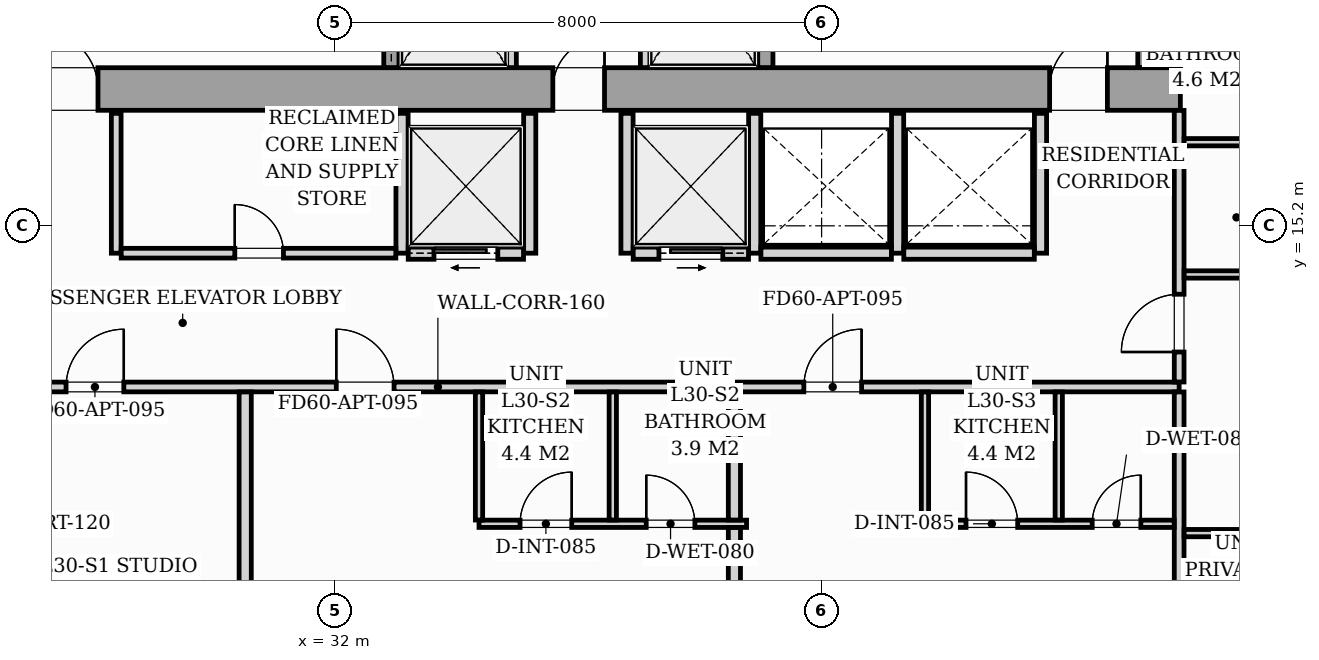
"""IFC4 building model, lengths in metres.
Left out: names, types, materials, properties, quantities, classifications, styles, units other than length and angle.
Written with IfcOpenShell. Run it as: python <this file> out.ifc"""

import sys

from ifc_helpers import new_model, si_unit, direction, frame, frame_2d, origin, origin_2d, place, context, subcontext, project, spatial, rectangle, i_section, extrude, source, transform, mapped, element, fill, save


model = new_model("IFC4")
c1 = context("Model", 3, precision=1e-05, world=origin(), true_north=direction((0.0, 1.0)))
c2 = subcontext(c1, "Body", "Model", "MODEL_VIEW")
j1 = project(units=[si_unit("LENGTHUNIT", "METRE"), si_unit("PLANEANGLEUNIT", "RADIAN")], contexts=[c1])
p1 = place(None, origin())
s1 = spatial("IfcSite", under=j1, at=p1, CompositionType="ELEMENT")
p2 = place(p1, origin())
s2 = spatial("IfcBuilding", under=s1, at=p2, CompositionType="ELEMENT")
p3 = place(p2, frame((0.0, 0.0, 106.6)))
s3 = spatial("IfcBuildingStorey", under=s2, at=p3, CompositionType="ELEMENT", Elevation=106.6)
m1 = source(origin(), c2, "Body", "SweptSolid", [
    extrude(i_section(OverallWidth=0.427, OverallDepth=0.483, WebThickness=0.051, FlangeThickness=0.082, FilletRadius=0.018, at=origin_2d()), origin(), (0.0, 0.0, 1.0), 3.196),
])
for number, where, z_axis, x_axis in (
    (1, (33.12, 17.4, 0.002), (0.0, 0.0, 1.0), (1.0, 0.0, 0.0)),
    (2, (38.88, 17.4, 0.002), (0.0, 0.0, 1.0), (1.0, 0.0, 0.0)),
    (3, (45.6, 17.4, 0.002), (0.0, 0.0, 1.0), (1.0, 0.0, 0.0)),
):
    element("IfcColumn", number, at=place(p3, frame(where, z_axis=z_axis, x_axis=x_axis)), inside=s3, PredefinedType="PILASTER", context=c2, shape_type="MappedRepresentation", body=[
        mapped(m1, transform((0.0, 0.0, 0.0), scale=1.0)),
    ])
p4 = place(p3, frame((26.1, 17.45, 0.0), z_axis=(0.0, 0.0, 1.0), x_axis=(1.0, 0.0, 0.0)))
e4 = element("IfcWall", 4, at=p4, inside=s3, PredefinedType="SHEAR", context=c2, shape_type="SweptSolid", body=[
    extrude(rectangle(XDim=19.8, YDim=0.7, at=frame_2d((9.9, 0.0))), origin(), (0.0, 0.0, 1.0), 3.2),
])
p5 = place(p4, frame((1.05, 0.0, 0.0)))
e5 = element("IfcOpeningElement", 5, at=p5, cuts=e4, PredefinedType="OPENING", context=c2, shape_type="SweptSolid", body=[
    extrude(rectangle(XDim=0.95, YDim=2.06, at=frame_2d((0.475, 1.03))), frame((0.0, 0.36, 0.0), z_axis=(0.0, -1.0, 0.0), x_axis=(1.0, 0.0, 0.0)), (0.0, 0.0, 1.0), 0.72),
])
p6 = place(p4, frame((9.48, 0.0, 0.0)))
e6 = element("IfcOpeningElement", 6, at=p6, cuts=e4, PredefinedType="OPENING", context=c2, shape_type="SweptSolid", body=[
    extrude(rectangle(XDim=0.85, YDim=2.0, at=frame_2d((0.425, 1.0))), frame((0.0, 0.36, 0.0), z_axis=(0.0, -1.0, 0.0), x_axis=(1.0, 0.0, 0.0)), (0.0, 0.0, 1.0), 0.72),
])
p7 = place(p4, frame((17.65, 0.0, 0.0)))
e7 = element("IfcOpeningElement", 7, at=p7, cuts=e4, PredefinedType="OPENING", context=c2, shape_type="SweptSolid", body=[
    extrude(rectangle(XDim=0.95, YDim=2.06, at=frame_2d((0.475, 1.03))), frame((0.0, 0.36, 0.0), z_axis=(0.0, -1.0, 0.0), x_axis=(1.0, 0.0, 0.0)), (0.0, 0.0, 1.0), 0.72),
])
p8 = place(p3, frame((45.55, 17.802, 0.0), z_axis=(0.0, 0.0, 1.0), x_axis=(0.0, 1.0, 0.0)))
e8 = element("IfcWall", 8, at=p8, inside=s3, PredefinedType="SHEAR", context=c2, shape_type="SweptSolid", body=[
    extrude(rectangle(XDim=5.796, YDim=0.7, at=frame_2d((2.898, 0.0))), origin(), (0.0, 0.0, 1.0), 3.2),
])
p9 = place(p3, frame((32.925, 17.802, 0.0), z_axis=(0.0, 0.0, 1.0), x_axis=(0.0, 1.0, 0.0)))
e9 = element("IfcWall", 9, at=p9, inside=s3, PredefinedType="SOLIDWALL", context=c2, shape_type="SweptSolid", body=[
    extrude(rectangle(XDim=2.646, YDim=0.25, at=frame_2d((1.323, 0.0))), origin(), (0.0, 0.0, 1.0), 3.2),
])
p10 = place(p9, frame((0.598, 0.0, 0.0)))
e10 = element("IfcOpeningElement", 10, at=p10, cuts=e9, PredefinedType="OPENING", context=c2, shape_type="SweptSolid", body=[
    extrude(rectangle(XDim=1.1, YDim=2.08, at=frame_2d((0.55, 1.04))), frame((0.0, 0.135, 0.0), z_axis=(0.0, -1.0, 0.0), x_axis=(1.0, 0.0, 0.0)), (0.0, 0.0, 1.0), 0.27),
])
for number, where, z_axis, x_axis in (
    (11, (34.9, 17.802, 0.0), (0.0, 0.0, 1.0), (0.0, 1.0, 0.0)),
    (12, (37.1, 17.802, 0.0), (0.0, 0.0, 1.0), (0.0, 1.0, 0.0)),
):
    element("IfcWall", number, at=place(p3, frame(where, z_axis=z_axis, x_axis=x_axis)), inside=s3, PredefinedType="PARTITIONING", context=c2, shape_type="SweptSolid", body=[
        extrude(rectangle(XDim=2.646, YDim=0.16, at=frame_2d((1.323, 0.0))), origin(), (0.0, 0.0, 1.0), 2.94),
    ])
p11 = place(p3, frame((39.075, 17.802, 0.0), z_axis=(0.0, 0.0, 1.0), x_axis=(0.0, 1.0, 0.0)))
e13 = element("IfcWall", 13, at=p11, inside=s3, PredefinedType="SOLIDWALL", context=c2, shape_type="SweptSolid", body=[
    extrude(rectangle(XDim=2.646, YDim=0.25, at=frame_2d((1.323, 0.0))), origin(), (0.0, 0.0, 1.0), 3.2),
])
p12 = place(p11, frame((0.598, 0.0, 0.0)))
e14 = element("IfcOpeningElement", 14, at=p12, cuts=e13, PredefinedType="OPENING", context=c2, shape_type="SweptSolid", body=[
    extrude(rectangle(XDim=1.1, YDim=2.08, at=frame_2d((0.55, 1.04))), frame((0.0, 0.135, 0.0), z_axis=(0.0, -1.0, 0.0), x_axis=(1.0, 0.0, 0.0)), (0.0, 0.0, 1.0), 0.27),
])
p13 = place(p3, frame((28.4, 14.75, 0.0), z_axis=(0.0, 0.0, 1.0), x_axis=(0.0, 1.0, 0.0)))
e15 = element("IfcWall", 15, at=p13, inside=s3, PredefinedType="PARTITIONING", context=c2, shape_type="SweptSolid", body=[
    extrude(rectangle(XDim=2.3, YDim=0.16, at=frame_2d((1.15, 0.0))), origin(), (0.0, 0.0, 1.0), 2.94),
])
p14 = place(p3, frame((33.1, 14.75, 0.0), z_axis=(0.0, 0.0, 1.0), x_axis=(0.0, 1.0, 0.0)))
e16 = element("IfcWall", 16, at=p14, inside=s3, PredefinedType="PARTITIONING", context=c2, shape_type="SweptSolid", body=[
    extrude(rectangle(XDim=2.3, YDim=0.2, at=frame_2d((1.15, 0.0))), origin(), (0.0, 0.0, 1.0), 2.94),
])
p15 = place(p3, frame((28.482, 14.75, 0.0), z_axis=(0.0, 0.0, 1.0), x_axis=(1.0, 0.0, 0.0)))
e17 = element("IfcWall", 17, at=p15, inside=s3, PredefinedType="PARTITIONING", context=c2, shape_type="SweptSolid", body=[
    extrude(rectangle(XDim=4.516, YDim=0.16, at=frame_2d((2.258, 0.0))), origin(), (0.0, 0.0, 1.0), 2.94),
])
p16 = place(p15, frame((1.868, 0.0, 0.0)))
e18 = element("IfcOpeningElement", 18, at=p16, cuts=e17, PredefinedType="OPENING", context=c2, shape_type="SweptSolid", body=[
    extrude(rectangle(XDim=0.8, YDim=2.05, at=frame_2d((0.4, 1.025))), frame((0.0, 0.09, 0.0), z_axis=(0.0, -1.0, 0.0), x_axis=(1.0, 0.0, 0.0)), (0.0, 0.0, 1.0), 0.18),
])
p17 = place(p3, frame((35.2, 14.75, 0.0), z_axis=(0.0, 0.0, 1.0), x_axis=(0.0, 1.0, 0.0)))
e19 = element("IfcWall", 19, at=p17, inside=s3, PredefinedType="PARTITIONING", context=c2, shape_type="SweptSolid", body=[
    extrude(rectangle(XDim=2.3, YDim=0.2, at=frame_2d((1.15, 0.0))), origin(), (0.0, 0.0, 1.0), 2.94),
])
p18 = place(p3, frame((33.202, 14.75, 0.0), z_axis=(0.0, 0.0, 1.0), x_axis=(1.0, 0.0, 0.0)))
e20 = element("IfcWall", 20, at=p18, inside=s3, PredefinedType="PARTITIONING", context=c2, shape_type="SweptSolid", body=[
    extrude(rectangle(XDim=1.896, YDim=0.2, at=frame_2d((0.948, 0.0))), origin(), (0.0, 0.0, 1.0), 2.94),
])
p19 = place(p18, frame((0.423, 0.0, 0.0)))
e21 = element("IfcOpeningElement", 21, at=p19, cuts=e20, PredefinedType="OPENING", context=c2, shape_type="SweptSolid", body=[
    extrude(rectangle(XDim=1.05, YDim=2.08, at=frame_2d((0.525, 1.04))), frame((0.0, 0.11, 0.0), z_axis=(0.0, -1.0, 0.0), x_axis=(1.0, 0.0, 0.0)), (0.0, 0.0, 1.0), 0.22),
])
for number, where, z_axis, x_axis in (
    (22, (36.8, 14.75, 0.0), (0.0, 0.0, 1.0), (0.0, 1.0, 0.0)),
    (23, (38.9, 14.75, 0.0), (0.0, 0.0, 1.0), (0.0, 1.0, 0.0)),
):
    element("IfcWall", number, at=place(p3, frame(where, z_axis=z_axis, x_axis=x_axis)), inside=s3, PredefinedType="PARTITIONING", context=c2, shape_type="SweptSolid", body=[
        extrude(rectangle(XDim=2.3, YDim=0.2, at=frame_2d((1.15, 0.0))), origin(), (0.0, 0.0, 1.0), 2.94),
    ])
p20 = place(p3, frame((36.902, 14.75, 0.0), z_axis=(0.0, 0.0, 1.0), x_axis=(1.0, 0.0, 0.0)))
e24 = element("IfcWall", 24, at=p20, inside=s3, PredefinedType="PARTITIONING", context=c2, shape_type="SweptSolid", body=[
    extrude(rectangle(XDim=1.896, YDim=0.2, at=frame_2d((0.948, 0.0))), origin(), (0.0, 0.0, 1.0), 2.94),
])
p21 = place(p20, frame((0.423, 0.0, 0.0)))
e25 = element("IfcOpeningElement", 25, at=p21, cuts=e24, PredefinedType="OPENING", context=c2, shape_type="SweptSolid", body=[
    extrude(rectangle(XDim=1.05, YDim=2.08, at=frame_2d((0.525, 1.04))), frame((0.0, 0.11, 0.0), z_axis=(0.0, -1.0, 0.0), x_axis=(1.0, 0.0, 0.0)), (0.0, 0.0, 1.0), 0.22),
])
for number, where, z_axis, x_axis in (
    (26, (41.25, 14.75, 0.0), (0.0, 0.0, 1.0), (0.0, 1.0, 0.0)),
    (27, (43.6, 14.75, 0.0), (0.0, 0.0, 1.0), (0.0, 1.0, 0.0)),
):
    element("IfcWall", number, at=place(p3, frame(where, z_axis=z_axis, x_axis=x_axis)), inside=s3, PredefinedType="PARTITIONING", context=c2, shape_type="SweptSolid", body=[
        extrude(rectangle(XDim=2.3, YDim=0.2, at=frame_2d((1.15, 0.0))), origin(), (0.0, 0.0, 1.0), 2.94),
    ])
for number, where, z_axis, x_axis in (
    (28, (39.002, 14.75, 0.0), (0.0, 0.0, 1.0), (1.0, 0.0, 0.0)),
    (29, (41.352, 14.75, 0.0), (0.0, 0.0, 1.0), (1.0, 0.0, 0.0)),
):
    element("IfcWall", number, at=place(p3, frame(where, z_axis=z_axis, x_axis=x_axis)), inside=s3, PredefinedType="PARTITIONING", context=c2, shape_type="SweptSolid", body=[
        extrude(rectangle(XDim=2.146, YDim=0.2, at=frame_2d((1.073, 0.0))), origin(), (0.0, 0.0, 1.0), 2.94),
    ])
p22 = place(p3, frame((21.5, 12.55, 0.0), z_axis=(0.0, 0.0, 1.0), x_axis=(1.0, 0.0, 0.0)))
e30 = element("IfcWall", 30, at=p22, inside=s3, PredefinedType="PARTITIONING", context=c2, shape_type="SweptSolid", body=[
    extrude(rectangle(XDim=24.38, YDim=0.16, at=frame_2d((12.19, 0.0))), origin(), (0.0, 0.0, 1.0), 2.94),
])
p23 = place(p22, frame((6.075, 0.0, 0.0)))
e31 = element("IfcOpeningElement", 31, at=p23, cuts=e30, PredefinedType="OPENING", context=c2, shape_type="SweptSolid", body=[
    extrude(rectangle(XDim=0.95, YDim=2.06, at=frame_2d((0.475, 1.03))), frame((0.0, 0.09, 0.0), z_axis=(0.0, -1.0, 0.0), x_axis=(1.0, 0.0, 0.0)), (0.0, 0.0, 1.0), 0.18),
])
p24 = place(p22, frame((10.519, 0.0, 0.0)))
e32 = element("IfcOpeningElement", 32, at=p24, cuts=e30, PredefinedType="OPENING", context=c2, shape_type="SweptSolid", body=[
    extrude(rectangle(XDim=0.95, YDim=2.06, at=frame_2d((0.475, 1.03))), frame((0.0, 0.09, 0.0), z_axis=(0.0, -1.0, 0.0), x_axis=(1.0, 0.0, 0.0)), (0.0, 0.0, 1.0), 0.18),
])
p25 = place(p22, frame((18.208, 0.0, 0.0)))
e33 = element("IfcOpeningElement", 33, at=p25, cuts=e30, PredefinedType="OPENING", context=c2, shape_type="SweptSolid", body=[
    extrude(rectangle(XDim=0.95, YDim=2.06, at=frame_2d((0.475, 1.03))), frame((0.0, 0.09, 0.0), z_axis=(0.0, -1.0, 0.0), x_axis=(1.0, 0.0, 0.0)), (0.0, 0.0, 1.0), 0.18),
])
p26 = place(p3, frame((45.88, 6.977, 0.0), z_axis=(0.0, 0.0, 1.0), x_axis=(0.0, 1.0, 0.0)))
e34 = element("IfcWall", 34, at=p26, inside=s3, PredefinedType="PARTITIONING", context=c2, shape_type="SweptSolid", body=[
    extrude(rectangle(XDim=5.491, YDim=0.16, at=frame_2d((2.745, 0.0))), origin(), (0.0, 0.0, 1.0), 2.94),
])
p27 = place(p3, frame((45.88, 12.632, 0.0), z_axis=(0.0, 0.0, 1.0), x_axis=(0.0, 1.0, 0.0)))
e35 = element("IfcWall", 35, at=p27, inside=s3, PredefinedType="PARTITIONING", context=c2, shape_type="SweptSolid", body=[
    extrude(rectangle(XDim=4.466, YDim=0.16, at=frame_2d((2.233, 0.0))), origin(), (0.0, 0.0, 1.0), 2.94),
])
p28 = place(p27, frame((0.493, 0.0, 0.0)))
e36 = element("IfcOpeningElement", 36, at=p28, cuts=e35, PredefinedType="OPENING", context=c2, shape_type="SweptSolid", body=[
    extrude(rectangle(XDim=0.95, YDim=2.06, at=frame_2d((0.475, 1.03))), frame((0.0, 0.09, 0.0), z_axis=(0.0, -1.0, 0.0), x_axis=(1.0, 0.0, 0.0)), (0.0, 0.0, 1.0), 0.18),
])
p29 = place(p3, frame((30.521, 5.681, 0.0), z_axis=(0.0, 0.0, 1.0), x_axis=(0.0, 1.0, 0.0)))
e37 = element("IfcWall", 37, at=p29, inside=s3, PredefinedType="PARTITIONING", context=c2, shape_type="SweptSolid", body=[
    extrude(rectangle(XDim=6.787, YDim=0.2, at=frame_2d((3.394, 0.0))), origin(), (0.0, 0.0, 1.0), 2.94),
])
p30 = place(p3, frame((34.366, 10.3, 0.0), z_axis=(0.0, 0.0, 1.0), x_axis=(1.0, 0.0, 0.0)))
e38 = element("IfcWall", 38, at=p30, inside=s3, PredefinedType="PARTITIONING", context=c2, shape_type="SweptSolid", body=[
    extrude(rectangle(XDim=4.4, YDim=0.12, at=frame_2d((2.2, 0.0))), origin(), (0.0, 0.0, 1.0), 2.94),
])
p31 = place(p30, frame((0.675, 0.0, 0.0)))
e39 = element("IfcOpeningElement", 39, at=p31, cuts=e38, PredefinedType="OPENING", context=c2, shape_type="SweptSolid", body=[
    extrude(rectangle(XDim=0.85, YDim=2.05, at=frame_2d((0.425, 1.025))), frame((0.0, 0.07, 0.0), z_axis=(0.0, -1.0, 0.0), x_axis=(1.0, 0.0, 0.0)), (0.0, 0.0, 1.0), 0.14),
])
p32 = place(p30, frame((2.75, 0.0, 0.0)))
e40 = element("IfcOpeningElement", 40, at=p32, cuts=e38, PredefinedType="OPENING", context=c2, shape_type="SweptSolid", body=[
    extrude(rectangle(XDim=0.8, YDim=2.02, at=frame_2d((0.4, 1.01))), frame((0.0, 0.07, 0.0), z_axis=(0.0, -1.0, 0.0), x_axis=(1.0, 0.0, 0.0)), (0.0, 0.0, 1.0), 0.14),
])
for number, where, z_axis, x_axis in (
    (41, (34.366, 10.362, 0.0), (0.0, 0.0, 1.0), (0.0, 1.0, 0.0)),
    (42, (36.566, 10.362, 0.0), (0.0, 0.0, 1.0), (0.0, 1.0, 0.0)),
):
    element("IfcWall", number, at=place(p3, frame(where, z_axis=z_axis, x_axis=x_axis)), inside=s3, PredefinedType="PARTITIONING", context=c2, shape_type="SweptSolid", body=[
        extrude(rectangle(XDim=2.106, YDim=0.12, at=frame_2d((1.053, 0.0))), origin(), (0.0, 0.0, 1.0), 2.94),
    ])
p33 = place(p3, frame((38.566, 6.273, 0.0), z_axis=(0.0, 0.0, 1.0), x_axis=(0.0, 1.0, 0.0)))
e43 = element("IfcWall", 43, at=p33, inside=s3, PredefinedType="PARTITIONING", context=c2, shape_type="SweptSolid", body=[
    extrude(rectangle(XDim=3.965, YDim=0.2, at=frame_2d((1.982, 0.0))), origin(), (0.0, 0.0, 1.0), 2.94),
])
p34 = place(p3, frame((38.566, 10.362, 0.0), z_axis=(0.0, 0.0, 1.0), x_axis=(0.0, 1.0, 0.0)))
e44 = element("IfcWall", 44, at=p34, inside=s3, PredefinedType="PARTITIONING", context=c2, shape_type="SweptSolid", body=[
    extrude(rectangle(XDim=2.106, YDim=0.2, at=frame_2d((1.053, 0.0))), origin(), (0.0, 0.0, 1.0), 2.94),
])
p35 = place(p3, frame((41.7, 10.3, 0.0), z_axis=(0.0, 0.0, 1.0), x_axis=(1.0, 0.0, 0.0)))
e45 = element("IfcWall", 45, at=p35, inside=s3, PredefinedType="PARTITIONING", context=c2, shape_type="SweptSolid", body=[
    extrude(rectangle(XDim=4.098, YDim=0.12, at=frame_2d((2.049, 0.0))), origin(), (0.0, 0.0, 1.0), 2.94),
])
p36 = place(p35, frame((0.675, 0.0, 0.0)))
e46 = element("IfcOpeningElement", 46, at=p36, cuts=e45, PredefinedType="OPENING", context=c2, shape_type="SweptSolid", body=[
    extrude(rectangle(XDim=0.85, YDim=2.05, at=frame_2d((0.425, 1.025))), frame((0.0, 0.07, 0.0), z_axis=(0.0, -1.0, 0.0), x_axis=(1.0, 0.0, 0.0)), (0.0, 0.0, 1.0), 0.14),
])
p37 = place(p35, frame((2.75, 0.0, 0.0)))
e47 = element("IfcOpeningElement", 47, at=p37, cuts=e45, PredefinedType="OPENING", context=c2, shape_type="SweptSolid", body=[
    extrude(rectangle(XDim=0.8, YDim=2.02, at=frame_2d((0.4, 1.01))), frame((0.0, 0.07, 0.0), z_axis=(0.0, -1.0, 0.0), x_axis=(1.0, 0.0, 0.0)), (0.0, 0.0, 1.0), 0.14),
])
for number, where, z_axis, x_axis in (
    (48, (41.7, 10.362, 0.0), (0.0, 0.0, 1.0), (0.0, 1.0, 0.0)),
    (49, (43.9, 10.362, 0.0), (0.0, 0.0, 1.0), (0.0, 1.0, 0.0)),
):
    element("IfcWall", number, at=place(p3, frame(where, z_axis=z_axis, x_axis=x_axis)), inside=s3, PredefinedType="PARTITIONING", context=c2, shape_type="SweptSolid", body=[
        extrude(rectangle(XDim=2.106, YDim=0.12, at=frame_2d((1.053, 0.0))), origin(), (0.0, 0.0, 1.0), 2.94),
    ])
for number, where, z_axis, x_axis in (
    (50, (45.962, 16.575, 0.0), (0.0, 0.0, 1.0), (1.0, 0.0, 0.0)),
    (51, (45.962, 14.4, 0.0), (0.0, 0.0, 1.0), (1.0, 0.0, 0.0)),
):
    element("IfcWall", number, at=place(p3, frame(where, z_axis=z_axis, x_axis=x_axis)), inside=s3, PredefinedType="PARTITIONING", context=c2, shape_type="SweptSolid", body=[
        extrude(rectangle(XDim=2.256, YDim=0.12, at=frame_2d((1.128, 0.0))), origin(), (0.0, 0.0, 1.0), 2.94),
    ])
p38 = place(p3, frame((45.962, 10.147, 0.0), z_axis=(0.0, 0.0, 1.0), x_axis=(1.0, 0.0, 0.0)))
e52 = element("IfcWall", 52, at=p38, inside=s3, PredefinedType="PARTITIONING", context=c2, shape_type="SweptSolid", body=[
    extrude(rectangle(XDim=20.994, YDim=0.12, at=frame_2d((10.497, 0.0))), origin(), (0.0, 0.0, 1.0), 2.31),
])
p39 = place(p38, frame((10.227, 0.0, 0.0)))
e53 = element("IfcOpeningElement", 53, at=p39, cuts=e52, PredefinedType="OPENING", context=c2, shape_type="SweptSolid", body=[
    extrude(rectangle(XDim=0.85, YDim=2.05, at=frame_2d((0.425, 1.025))), frame((0.0, 0.07, 0.0), z_axis=(0.0, -1.0, 0.0), x_axis=(1.0, 0.0, 0.0)), (0.0, 0.0, 1.0), 0.14),
])
m2 = source(origin(), c2, "Body", "SweptSolid", [
    extrude(rectangle(XDim=0.95, YDim=2.06, at=frame_2d((0.475, 1.03))), frame((0.0, 0.025, 0.0), z_axis=(0.0, -1.0, 0.0), x_axis=(1.0, 0.0, 0.0)), (0.0, 0.0, 1.0), 0.05),
])
p40 = place(p5, origin())
e54 = element("IfcDoor", 54, at=p40, inside=s3, OperationType="SINGLE_SWING_LEFT", PredefinedType="DOOR", context=c2, shape_type="MappedRepresentation", body=[
    mapped(m2, transform((0.0, 0.0, 0.0), scale=1.0)),
])
fill(e5, e54)
m3 = source(origin(), c2, "Body", "SweptSolid", [
    extrude(rectangle(XDim=0.85, YDim=2.0, at=frame_2d((0.425, 1.0))), frame((0.0, 0.025, 0.0), z_axis=(0.0, -1.0, 0.0), x_axis=(1.0, 0.0, 0.0)), (0.0, 0.0, 1.0), 0.05),
])
p41 = place(p6, origin())
e55 = element("IfcDoor", 55, at=p41, inside=s3, OperationType="SINGLE_SWING_RIGHT", PredefinedType="DOOR", context=c2, shape_type="MappedRepresentation", body=[
    mapped(m3, transform((0.0, 0.0, 0.0), scale=1.0)),
])
fill(e6, e55)
p42 = place(p7, origin())
e56 = element("IfcDoor", 56, at=p42, inside=s3, OperationType="SINGLE_SWING_RIGHT", PredefinedType="DOOR", context=c2, shape_type="MappedRepresentation", body=[
    mapped(m2, transform((0.0, 0.0, 0.0), scale=1.0)),
])
fill(e7, e56)
m4 = source(origin(), c2, "Body", "SweptSolid", [
    extrude(rectangle(XDim=0.8, YDim=2.05, at=frame_2d((0.4, 1.025))), frame((0.0, 0.025, 0.0), z_axis=(0.0, -1.0, 0.0), x_axis=(1.0, 0.0, 0.0)), (0.0, 0.0, 1.0), 0.05),
])
p43 = place(p16, origin())
e57 = element("IfcDoor", 57, at=p43, inside=s3, OperationType="SINGLE_SWING_LEFT", PredefinedType="DOOR", context=c2, shape_type="MappedRepresentation", body=[
    mapped(m4, transform((0.0, 0.0, 0.0), scale=1.0)),
])
fill(e18, e57)
m5 = source(origin(), c2, "Body", "SweptSolid", [
    extrude(rectangle(XDim=1.05, YDim=2.08, at=frame_2d((0.525, 1.04))), frame((0.0, 0.025, 0.0), z_axis=(0.0, -1.0, 0.0), x_axis=(1.0, 0.0, 0.0)), (0.0, 0.0, 1.0), 0.05),
])
p44 = place(p19, origin())
e58 = element("IfcDoor", 58, at=p44, inside=s3, OperationType="SLIDING_TO_LEFT", PredefinedType="DOOR", context=c2, shape_type="MappedRepresentation", body=[
    mapped(m5, transform((0.0, 0.0, 0.0), scale=1.0)),
])
fill(e21, e58)
p45 = place(p21, origin())
e59 = element("IfcDoor", 59, at=p45, inside=s3, OperationType="SLIDING_TO_RIGHT", PredefinedType="DOOR", context=c2, shape_type="MappedRepresentation", body=[
    mapped(m5, transform((0.0, 0.0, 0.0), scale=1.0)),
])
fill(e25, e59)
m6 = source(origin(), c2, "Body", "SweptSolid", [
    extrude(rectangle(XDim=0.95, YDim=2.06, at=frame_2d((0.475, 1.03))), frame((0.0, 0.025, 0.0), z_axis=(0.0, -1.0, 0.0), x_axis=(1.0, 0.0, 0.0)), (0.0, 0.0, 1.0), 0.05),
])
p46 = place(p23, origin())
e60 = element("IfcDoor", 60, at=p46, inside=s3, OperationType="SINGLE_SWING_RIGHT", PredefinedType="DOOR", context=c2, shape_type="MappedRepresentation", body=[
    mapped(m6, transform((0.0, 0.0, 0.0), scale=1.0)),
])
fill(e31, e60)
p47 = place(p24, origin())
e61 = element("IfcDoor", 61, at=p47, inside=s3, OperationType="SINGLE_SWING_LEFT", PredefinedType="DOOR", context=c2, shape_type="MappedRepresentation", body=[
    mapped(m6, transform((0.0, 0.0, 0.0), scale=1.0)),
])
fill(e32, e61)
m7 = source(origin(), c2, "Body", "SweptSolid", [
    extrude(rectangle(XDim=0.85, YDim=2.05, at=frame_2d((0.425, 1.025))), frame((0.0, 0.025, 0.0), z_axis=(0.0, -1.0, 0.0), x_axis=(1.0, 0.0, 0.0)), (0.0, 0.0, 1.0), 0.05),
])
p48 = place(p31, origin())
e62 = element("IfcDoor", 62, at=p48, inside=s3, OperationType="SINGLE_SWING_RIGHT", PredefinedType="DOOR", context=c2, shape_type="MappedRepresentation", body=[
    mapped(m7, transform((0.0, 0.0, 0.0), scale=1.0)),
])
fill(e39, e62)
m8 = source(origin(), c2, "Body", "SweptSolid", [
    extrude(rectangle(XDim=0.8, YDim=2.02, at=frame_2d((0.4, 1.01))), frame((0.0, 0.025, 0.0), z_axis=(0.0, -1.0, 0.0), x_axis=(1.0, 0.0, 0.0)), (0.0, 0.0, 1.0), 0.05),
])
p49 = place(p32, origin())
e63 = element("IfcDoor", 63, at=p49, inside=s3, OperationType="SINGLE_SWING_LEFT", PredefinedType="DOOR", context=c2, shape_type="MappedRepresentation", body=[
    mapped(m8, transform((0.0, 0.0, 0.0), scale=1.0)),
])
fill(e40, e63)
p50 = place(p25, origin())
e64 = element("IfcDoor", 64, at=p50, inside=s3, OperationType="SINGLE_SWING_RIGHT", PredefinedType="DOOR", context=c2, shape_type="MappedRepresentation", body=[
    mapped(m6, transform((0.0, 0.0, 0.0), scale=1.0)),
])
fill(e33, e64)
p51 = place(p36, origin())
e65 = element("IfcDoor", 65, at=p51, inside=s3, OperationType="SINGLE_SWING_LEFT", PredefinedType="DOOR", context=c2, shape_type="MappedRepresentation", body=[
    mapped(m7, transform((0.0, 0.0, 0.0), scale=1.0)),
])
fill(e46, e65)
p52 = place(p37, origin())
e66 = element("IfcDoor", 66, at=p52, inside=s3, OperationType="SINGLE_SWING_RIGHT", PredefinedType="DOOR", context=c2, shape_type="MappedRepresentation", body=[
    mapped(m8, transform((0.0, 0.0, 0.0), scale=1.0)),
])
fill(e47, e66)
p53 = place(p28, origin())
e67 = element("IfcDoor", 67, at=p53, inside=s3, OperationType="SINGLE_SWING_LEFT", PredefinedType="DOOR", context=c2, shape_type="MappedRepresentation", body=[
    mapped(m6, transform((0.0, 0.0, 0.0), scale=1.0)),
])
fill(e36, e67)
save(model, sys.argv[1])
